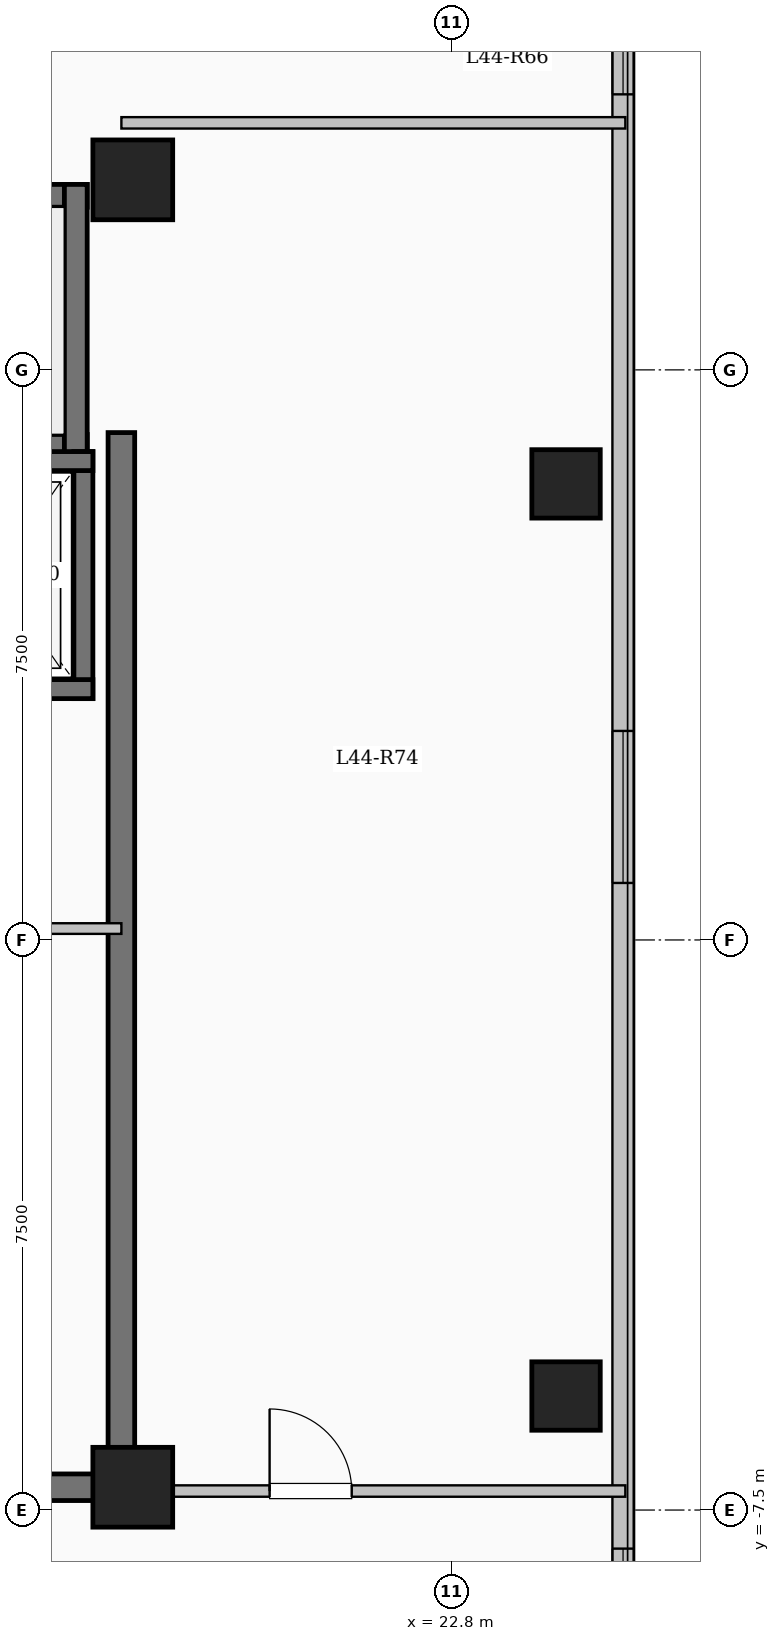
"""IFC4 building model, lengths in metres.
Left out: names, types, materials, properties, quantities, classifications, styles, units other than length and angle.
Written with IfcOpenShell. Run it as: python <this file> out.ifc"""

import sys

from ifc_helpers import new_model, si_unit, direction, frame, frame_2d, origin, origin_2d, place, context, subcontext, project, spatial, rectangle, extrude, element, fill, save


model = new_model("IFC4")
c1 = context("Model", 3, precision=1e-05, world=origin(), true_north=direction((0.0, 1.0)))
c2 = subcontext(c1, "Body", "Model", "MODEL_VIEW")
j1 = project(units=[si_unit("LENGTHUNIT", "METRE"), si_unit("PLANEANGLEUNIT", "RADIAN")], contexts=[c1])
p1 = place(None, origin())
s1 = spatial("IfcSite", under=j1, at=p1, CompositionType="ELEMENT")
p2 = place(p1, origin())
s2 = spatial("IfcBuilding", under=s1, at=p2, CompositionType="ELEMENT")
p3 = place(p2, frame((0.0, 0.0, 162.75)))
s3 = spatial("IfcBuildingStorey", under=s2, at=p3, CompositionType="ELEMENT", Elevation=162.75)
for number, where, z_axis, x_axis in (
    (1, (18.6, -7.2, 0.0), (0.0, 0.0, 1.0), (1.0, 0.0, 0.0)),
    (2, (18.6, 10.0, 0.0), (0.0, 0.0, 1.0), (1.0, 0.0, 0.0)),
):
    element("IfcColumn", number, at=place(p3, frame(where, z_axis=z_axis, x_axis=x_axis)), inside=s3, PredefinedType="COLUMN", context=c2, shape_type="SweptSolid", body=[
        extrude(rectangle(XDim=1.05, YDim=1.05, at=origin_2d()), origin(), (0.0, 0.0, 1.0), 3.35),
    ])
for number, where, z_axis, x_axis in (
    (3, (24.3, -6.0, 0.0), (0.0, 0.0, 1.0), (1.0, 0.0, 0.0)),
    (4, (24.3, 6.0, 0.0), (0.0, 0.0, 1.0), (1.0, 0.0, 0.0)),
):
    element("IfcColumn", number, at=place(p3, frame(where, z_axis=z_axis, x_axis=x_axis)), inside=s3, PredefinedType="COLUMN", context=c2, shape_type="SweptSolid", body=[
        extrude(rectangle(XDim=0.9, YDim=0.9, at=origin_2d()), origin(), (0.0, 0.0, 1.0), 3.35),
    ])
p4 = place(p3, frame((25.05, 17.25, 0.0), z_axis=(0.0, 0.0, 1.0), x_axis=(0.0, -1.0, 0.0)))
e5 = element("IfcWall", 5, at=p4, inside=s3, PredefinedType="SOLIDWALL", context=c2, shape_type="SweptSolid", body=[
    extrude(rectangle(XDim=34.5, YDim=0.28, at=frame_2d((17.25, 0.0))), origin(), (0.0, 0.0, 1.0), 3.1),
])
p5 = place(p4, frame((1.375, 0.0, 0.9)))
e6 = element("IfcOpeningElement", 6, at=p5, cuts=e5, PredefinedType="OPENING", context=c2, shape_type="SweptSolid", body=[
    extrude(rectangle(XDim=2.0, YDim=1.7, at=frame_2d((1.0, 0.85))), frame((0.0, 0.15, 0.0), z_axis=(0.0, -1.0, 0.0), x_axis=(1.0, 0.0, 0.0)), (0.0, 0.0, 1.0), 0.3),
])
p6 = place(p4, frame((5.125, 0.0, 0.95)))
e7 = element("IfcOpeningElement", 7, at=p6, cuts=e5, PredefinedType="OPENING", context=c2, shape_type="SweptSolid", body=[
    extrude(rectangle(XDim=1.0, YDim=1.5, at=frame_2d((0.5, 0.75))), frame((0.0, 0.15, 0.0), z_axis=(0.0, -1.0, 0.0), x_axis=(1.0, 0.0, 0.0)), (0.0, 0.0, 1.0), 0.3),
])
p7 = place(p4, frame((14.5, 0.0, 0.9)))
e8 = element("IfcOpeningElement", 8, at=p7, cuts=e5, PredefinedType="OPENING", context=c2, shape_type="SweptSolid", body=[
    extrude(rectangle(XDim=2.0, YDim=1.7, at=frame_2d((1.0, 0.85))), frame((0.0, 0.15, 0.0), z_axis=(0.0, -1.0, 0.0), x_axis=(1.0, 0.0, 0.0)), (0.0, 0.0, 1.0), 0.3),
])
p8 = place(p4, frame((25.258, 0.0, 0.9)))
e9 = element("IfcOpeningElement", 9, at=p8, cuts=e5, PredefinedType="OPENING", context=c2, shape_type="SweptSolid", body=[
    extrude(rectangle(XDim=1.5, YDim=1.65, at=frame_2d((0.75, 0.825))), frame((0.0, 0.15, 0.0), z_axis=(0.0, -1.0, 0.0), x_axis=(1.0, 0.0, 0.0)), (0.0, 0.0, 1.0), 0.3),
])
p9 = place(p4, frame((29.95, 0.0, 0.9)))
e10 = element("IfcOpeningElement", 10, at=p9, cuts=e5, PredefinedType="OPENING", context=c2, shape_type="SweptSolid", body=[
    extrude(rectangle(XDim=2.2, YDim=1.75, at=frame_2d((1.1, 0.875))), frame((0.0, 0.15, 0.0), z_axis=(0.0, -1.0, 0.0), x_axis=(1.0, 0.0, 0.0)), (0.0, 0.0, 1.0), 0.3),
])
p10 = place(p3, frame((10.0, 9.79, 0.0), z_axis=(0.0, 0.0, 1.0), x_axis=(1.0, 0.0, 0.0)))
e11 = element("IfcWall", 11, at=p10, inside=s3, PredefinedType="SHEAR", context=c2, shape_type="SweptSolid", body=[
    extrude(rectangle(XDim=8.0, YDim=0.3, at=frame_2d((4.0, 0.0))), origin(), (0.0, 0.0, 1.0), 3.35),
])
p11 = place(p3, frame((10.0, 6.5, 0.0), z_axis=(0.0, 0.0, 1.0), x_axis=(1.0, 0.0, 0.0)))
e12 = element("IfcWall", 12, at=p11, inside=s3, PredefinedType="SHEAR", context=c2, shape_type="SweptSolid", body=[
    extrude(rectangle(XDim=8.0, YDim=0.3, at=frame_2d((4.0, 0.0))), origin(), (0.0, 0.0, 1.0), 3.35),
])
p12 = place(p11, frame((0.55, 0.0, 0.0)))
e13 = element("IfcOpeningElement", 13, at=p12, cuts=e12, PredefinedType="OPENING", context=c2, shape_type="SweptSolid", body=[
    extrude(rectangle(XDim=1.0, YDim=2.15, at=frame_2d((0.5, 1.075))), frame((0.0, 0.16, 0.0), z_axis=(0.0, -1.0, 0.0), x_axis=(1.0, 0.0, 0.0)), (0.0, 0.0, 1.0), 0.32),
])
p13 = place(p3, frame((17.85, 6.35, 0.0), z_axis=(0.0, 0.0, 1.0), x_axis=(0.0, 1.0, 0.0)))
e14 = element("IfcWall", 14, at=p13, inside=s3, PredefinedType="SHEAR", context=c2, shape_type="SweptSolid", body=[
    extrude(rectangle(XDim=3.59, YDim=0.3, at=frame_2d((1.795, 0.0))), origin(), (0.0, 0.0, 1.0), 3.35),
])
p14 = place(p3, frame((17.95, 3.175, 0.0), z_axis=(0.0, 0.0, 1.0), x_axis=(0.0, 1.0, 0.0)))
e15 = element("IfcWall", 15, at=p14, inside=s3, PredefinedType="SHEAR", context=c2, shape_type="SweptSolid", body=[
    extrude(rectangle(XDim=3.25, YDim=0.25, at=frame_2d((1.625, 0.0))), origin(), (0.0, 0.0, 1.0), 3.35),
])
for number, where, z_axis, x_axis in (
    (16, (15.525, 3.3, 0.0), (0.0, 0.0, 1.0), (1.0, 0.0, 0.0)),
    (17, (15.525, 6.3, 0.0), (0.0, 0.0, 1.0), (1.0, 0.0, 0.0)),
):
    element("IfcWall", number, at=place(p3, frame(where, z_axis=z_axis, x_axis=x_axis)), inside=s3, PredefinedType="SHEAR", context=c2, shape_type="SweptSolid", body=[
        extrude(rectangle(XDim=2.55, YDim=0.25, at=frame_2d((1.275, 0.0))), origin(), (0.0, 0.0, 1.0), 3.35),
    ])
p15 = place(p3, frame((18.45, -7.375, 0.0), z_axis=(0.0, 0.0, 1.0), x_axis=(0.0, 1.0, 0.0)))
e18 = element("IfcWall", 18, at=p15, inside=s3, PredefinedType="SHEAR", context=c2, shape_type="SweptSolid", body=[
    extrude(rectangle(XDim=14.05, YDim=0.35, at=frame_2d((7.025, 0.0))), origin(), (0.0, 0.0, 1.0), 3.35),
])
p16 = place(p3, frame((10.075, -7.2, 0.0), z_axis=(0.0, 0.0, 1.0), x_axis=(1.0, 0.0, 0.0)))
e19 = element("IfcWall", 19, at=p16, inside=s3, PredefinedType="SHEAR", context=c2, shape_type="SweptSolid", body=[
    extrude(rectangle(XDim=8.55, YDim=0.35, at=frame_2d((4.275, 0.0))), origin(), (0.0, 0.0, 1.0), 3.35),
])
p17 = place(p3, frame((15.4, 0.15, 0.0), z_axis=(0.0, 0.0, 1.0), x_axis=(1.0, 0.0, 0.0)))
e20 = element("IfcWall", 20, at=p17, inside=s3, PredefinedType="PARTITIONING", context=c2, shape_type="SweptSolid", body=[
    extrude(rectangle(XDim=3.05, YDim=0.14, at=frame_2d((1.525, 0.0))), origin(), (0.0, 0.0, 1.0), 3.1),
])
p18 = place(p17, frame((1.05, 0.0, 0.0)))
e21 = element("IfcOpeningElement", 21, at=p18, cuts=e20, PredefinedType="OPENING", context=c2, shape_type="SweptSolid", body=[
    extrude(rectangle(XDim=0.9, YDim=2.08, at=frame_2d((0.45, 1.04))), frame((0.0, 0.08, 0.0), z_axis=(0.0, -1.0, 0.0), x_axis=(1.0, 0.0, 0.0)), (0.0, 0.0, 1.0), 0.16),
])
p19 = place(p3, frame((18.45, -7.25, 0.0), z_axis=(0.0, 0.0, 1.0), x_axis=(1.0, 0.0, 0.0)))
e22 = element("IfcWall", 22, at=p19, inside=s3, PredefinedType="PARTITIONING", context=c2, shape_type="SweptSolid", body=[
    extrude(rectangle(XDim=6.63, YDim=0.15, at=frame_2d((3.315, 0.0))), origin(), (0.0, 0.0, 1.0), 3.1),
])
p20 = place(p19, frame((1.95, 0.0, 0.0)))
e23 = element("IfcOpeningElement", 23, at=p20, cuts=e22, PredefinedType="OPENING", context=c2, shape_type="SweptSolid", body=[
    extrude(rectangle(XDim=1.08, YDim=2.15, at=frame_2d((0.54, 1.075))), frame((0.0, 0.085, 0.0), z_axis=(0.0, -1.0, 0.0), x_axis=(1.0, 0.0, 0.0)), (0.0, 0.0, 1.0), 0.17),
])
p21 = place(p3, frame((18.45, 10.75, 0.0), z_axis=(0.0, 0.0, 1.0), x_axis=(1.0, 0.0, 0.0)))
e24 = element("IfcWall", 24, at=p21, inside=s3, PredefinedType="PARTITIONING", context=c2, shape_type="SweptSolid", body=[
    extrude(rectangle(XDim=6.63, YDim=0.15, at=frame_2d((3.315, 0.0))), origin(), (0.0, 0.0, 1.0), 3.1),
])
p22 = place(p6, origin())
e25 = element("IfcWindow", 25, at=p22, inside=s3, PartitioningType="SINGLE_PANEL", PredefinedType="WINDOW", context=c2, shape_type="SweptSolid", body=[
    extrude(rectangle(XDim=1.0, YDim=1.5, at=frame_2d((0.5, 0.75))), frame((0.0, 0.03, 0.0), z_axis=(0.0, -1.0, 0.0), x_axis=(1.0, 0.0, 0.0)), (0.0, 0.0, 1.0), 0.06),
])
fill(e7, e25)
p23 = place(p7, origin())
e26 = element("IfcWindow", 26, at=p23, inside=s3, PartitioningType="SINGLE_PANEL", PredefinedType="WINDOW", context=c2, shape_type="SweptSolid", body=[
    extrude(rectangle(XDim=2.0, YDim=1.7, at=frame_2d((1.0, 0.85))), frame((0.0, 0.03, 0.0), z_axis=(0.0, -1.0, 0.0), x_axis=(1.0, 0.0, 0.0)), (0.0, 0.0, 1.0), 0.06),
])
fill(e8, e26)
p24 = place(p8, origin())
e27 = element("IfcWindow", 27, at=p24, inside=s3, PartitioningType="SINGLE_PANEL", PredefinedType="WINDOW", context=c2, shape_type="SweptSolid", body=[
    extrude(rectangle(XDim=1.5, YDim=1.65, at=frame_2d((0.75, 0.825))), frame((0.0, 0.03, 0.0), z_axis=(0.0, -1.0, 0.0), x_axis=(1.0, 0.0, 0.0)), (0.0, 0.0, 1.0), 0.06),
])
fill(e9, e27)
p25 = place(p20, origin())
e28 = element("IfcDoor", 28, at=p25, inside=s3, OperationType="SINGLE_SWING_LEFT", PredefinedType="DOOR", context=c2, shape_type="SweptSolid", body=[
    extrude(rectangle(XDim=1.08, YDim=2.15, at=frame_2d((0.54, 1.075))), frame((0.0, 0.025, 0.0), z_axis=(0.0, -1.0, 0.0), x_axis=(1.0, 0.0, 0.0)), (0.0, 0.0, 1.0), 0.05),
])
fill(e23, e28)
save(model, sys.argv[1])
